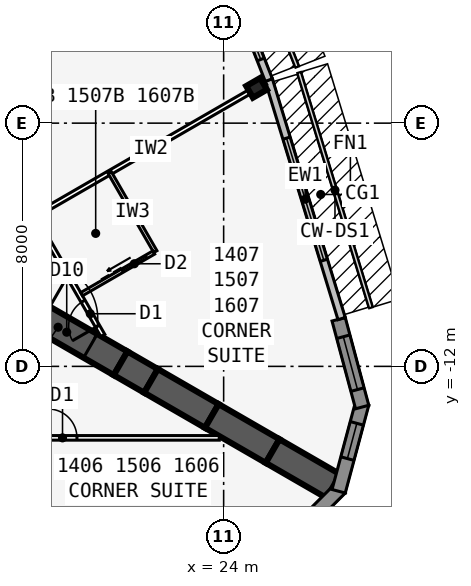
"""IFC4 building model, lengths in metres.
Left out: names, types, materials, properties, quantities, classifications, styles, units other than length and angle.
Written with IfcOpenShell. Run it as: python <this file> out.ifc"""

import sys

from ifc_helpers import new_model, si_unit, direction, frame, frame_2d, origin, origin_2d, place, context, subcontext, project, spatial, polyline, rectangle, i_section, outline, extrude, element, fill, save


model = new_model("IFC4")
c1 = context("Model", 3, precision=1e-05, world=origin(), true_north=direction((0.0, 1.0)))
c2 = subcontext(c1, "Body", "Model", "MODEL_VIEW")
j1 = project(units=[si_unit("LENGTHUNIT", "METRE"), si_unit("PLANEANGLEUNIT", "RADIAN")], contexts=[c1])
p1 = place(None, origin())
s1 = spatial("IfcSite", under=j1, at=p1, CompositionType="ELEMENT")
p2 = place(p1, origin())
s2 = spatial("IfcBuilding", under=s1, at=p2, CompositionType="ELEMENT")
p3 = place(p2, frame((0.0, 0.0, 59.1)))
s3 = spatial("IfcBuildingStorey", under=s2, at=p3, CompositionType="ELEMENT", Elevation=59.1)
p4 = place(p3, frame((16.5, -9.526, 0.0), z_axis=(0.0, 0.0, 1.0), x_axis=(0.866031398331, -0.499989616998, 0.0)))
e1 = element("IfcWall", 1, at=p4, inside=s3, PredefinedType="SHEAR", context=c2, shape_type="SweptSolid", body=[
    extrude(rectangle(XDim=4.746, YDim=0.9, at=frame_2d((2.373, 0.0))), origin(), (0.0, 0.0, 1.0), 3.4),
])
p5 = place(p4, frame((1.8, 0.0, 0.0)))
e2 = element("IfcOpeningElement", 2, at=p5, cuts=e1, PredefinedType="OPENING", context=c2, shape_type="SweptSolid", body=[
    extrude(rectangle(XDim=1.8, YDim=2.13, at=frame_2d((0.9, 1.065))), frame((0.0, 0.46, 0.0), z_axis=(0.0, -1.0, 0.0), x_axis=(1.0, 0.0, 0.0)), (0.0, 0.0, 1.0), 0.92),
])
p6 = place(p3, frame((20.61, -11.899, 0.0), z_axis=(0.0, 0.0, 1.0), x_axis=(0.866009537788, -0.500027479704, 0.0)))
e3 = element("IfcWall", 3, at=p6, inside=s3, PredefinedType="SHEAR", context=c2, shape_type="SweptSolid", body=[
    extrude(rectangle(XDim=1.155, YDim=0.9, at=frame_2d((0.577, 0.0))), origin(), (0.0, 0.0, 1.0), 3.4),
])
for number, where, z_axis, x_axis in (
    (4, (21.61, -12.477, 0.0), (0.0, 0.0, 1.0), (0.866, -0.5, 0.0)),
    (5, (23.61, -13.631, 0.0), (0.0, 0.0, 1.0), (0.866, -0.5, 0.0)),
    (6, (25.61, -14.786, 0.0), (0.0, 0.0, 1.0), (0.866, -0.5, 0.0)),
):
    element("IfcWall", number, at=place(p3, frame(where, z_axis=z_axis, x_axis=x_axis)), inside=s3, PredefinedType="SHEAR", context=c2, shape_type="SweptSolid", body=[
        extrude(rectangle(XDim=2.309, YDim=0.9, at=frame_2d((1.155, 0.0))), origin(), (0.0, 0.0, 1.0), 3.4),
    ])
p7 = place(p3, frame((25.083, -2.839, 0.0), z_axis=(0.0, 0.0, 1.0), x_axis=(-0.5, 0.866025403784, 0.0)))
e7 = element("IfcColumn", 7, at=p7, inside=s3, PredefinedType="COLUMN", context=c2, shape_type="SweptSolid", body=[
    extrude(i_section(OverallWidth=0.442, OverallDepth=0.531, WebThickness=0.066, FlangeThickness=0.106, at=origin_2d()), origin(), (0.0, 0.0, 1.0), 3.4),
])
p8 = place(p3, frame((25.728, -18.12, 0.0), z_axis=(0.0, 0.0, 1.0), x_axis=(0.707025086683, 0.707188466253, 0.0)))
e8 = element("IfcWall", 8, at=p8, inside=s3, PredefinedType="SOLIDWALL", context=c2, shape_type="SweptSolid", body=[
    extrude(outline(polyline([(2.989, 0.225), (2.93, 0.225), (2.438, 0.093), (2.402, 0.225), (0.0, 0.225), (0.0, -0.225), (2.989, -0.225), (2.989, 0.225)])), origin(), (0.0, 0.0, 1.0), 3.235),
])
p9 = place(p8, frame((0.676, 0.0, 0.45)))
e9 = element("IfcOpeningElement", 9, at=p9, cuts=e8, PredefinedType="OPENING", context=c2, shape_type="SweptSolid", body=[
    extrude(rectangle(XDim=1.2, YDim=2.4, at=frame_2d((0.6, 1.2))), frame((0.0, 0.235, 0.0), z_axis=(0.0, -1.0, 0.0), x_axis=(1.0, 0.0, 0.0)), (0.0, 0.0, 1.0), 0.47),
])
p10 = place(p3, frame((27.783, -16.108, 0.0), z_axis=(0.0, 0.0, 1.0), x_axis=(0.258801419081, 0.965930548995, 0.0)))
e10 = element("IfcWall", 10, at=p10, inside=s3, PredefinedType="SOLIDWALL", context=c2, shape_type="SweptSolid", body=[
    extrude(outline(polyline([(2.989, 0.225), (0.586, 0.225), (0.551, 0.093), (0.06, 0.225), (0.0, 0.225), (0.0, -0.225), (2.989, -0.225), (2.989, 0.225)])), origin(), (0.0, 0.0, 1.0), 3.235),
])
p11 = place(p10, frame((1.113, 0.0, 0.45)))
e11 = element("IfcOpeningElement", 11, at=p11, cuts=e10, PredefinedType="OPENING", context=c2, shape_type="SweptSolid", body=[
    extrude(rectangle(XDim=1.2, YDim=2.4, at=frame_2d((0.6, 1.2))), frame((0.0, 0.235, 0.0), z_axis=(0.0, -1.0, 0.0), x_axis=(1.0, 0.0, 0.0)), (0.0, 0.0, 1.0), 0.47),
])
p12 = place(p3, frame((28.556, -13.337, 0.0), z_axis=(0.0, 0.0, 1.0), x_axis=(-0.258780998834, 0.965936019953, 0.0)))
e12 = element("IfcWall", 12, at=p12, inside=s3, PredefinedType="SOLIDWALL", context=c2, shape_type="SweptSolid", body=[
    extrude(rectangle(XDim=2.989, YDim=0.45, at=frame_2d((1.494, 0.0))), origin(), (0.0, 0.0, 1.0), 3.235),
])
p13 = place(p12, frame((0.594, 0.0, 0.45)))
e13 = element("IfcOpeningElement", 13, at=p13, cuts=e12, PredefinedType="OPENING", context=c2, shape_type="SweptSolid", body=[
    extrude(rectangle(XDim=1.8, YDim=2.4, at=frame_2d((0.9, 1.2))), frame((0.0, 0.235, 0.0), z_axis=(0.0, -1.0, 0.0), x_axis=(1.0, 0.0, 0.0)), (0.0, 0.0, 1.0), 0.47),
])
p14 = place(p3, frame((27.88, -10.429, 0.0), z_axis=(0.0, 0.0, 1.0), x_axis=(-0.2919790669, 0.956424709265, 0.0)))
e14 = element("IfcWall", 14, at=p14, inside=s3, PredefinedType="STANDARD", context=c2, shape_type="SweptSolid", body=[
    extrude(rectangle(XDim=8.211, YDim=0.25, at=frame_2d((4.105, 0.0))), origin(), (0.0, 0.0, 1.0), 3.235),
])
p15 = place(p14, frame((2.006, 0.0, 0.45)))
e15 = element("IfcOpeningElement", 15, at=p15, cuts=e14, PredefinedType="OPENING", context=c2, shape_type="SweptSolid", body=[
    extrude(rectangle(XDim=4.2, YDim=2.4, at=frame_2d((2.1, 1.2))), frame((0.0, 0.135, 0.0), z_axis=(0.0, -1.0, 0.0), x_axis=(1.0, 0.0, 0.0)), (0.0, 0.0, 1.0), 0.27),
])
p16 = place(p3, frame((25.486, -2.584, 0.0), z_axis=(0.0, 0.0, 1.0), x_axis=(-0.364013463868, 0.931393685894, 0.0)))
e16 = element("IfcWall", 16, at=p16, inside=s3, PredefinedType="STANDARD", context=c2, shape_type="SweptSolid", body=[
    extrude(rectangle(XDim=5.058, YDim=0.25, at=frame_2d((2.529, 0.0))), origin(), (0.0, 0.0, 1.0), 3.235),
])
p17 = place(p16, frame((0.729, 0.0, 0.45)))
e17 = element("IfcOpeningElement", 17, at=p17, cuts=e16, PredefinedType="OPENING", context=c2, shape_type="SweptSolid", body=[
    extrude(rectangle(XDim=3.6, YDim=2.4, at=frame_2d((1.8, 1.2))), frame((0.0, 0.135, 0.0), z_axis=(0.0, -1.0, 0.0), x_axis=(1.0, 0.0, 0.0)), (0.0, 0.0, 1.0), 0.27),
])
p18 = place(p3, frame((-23.857, -14.351, 0.0), z_axis=(0.0, 0.0, 1.0), x_axis=(1.0, 0.0, 0.0)))
e18 = element("IfcWall", 18, at=p18, inside=s3, PredefinedType="PARTITIONING", context=c2, shape_type="SweptSolid", body=[
    extrude(rectangle(XDim=47.714, YDim=0.15, at=frame_2d((23.857, 0.0))), origin(), (0.0, 0.0, 1.0), 3.235),
])
p19 = place(p18, frame((4.682, 0.0, 0.0)))
e19 = element("IfcOpeningElement", 19, at=p19, cuts=e18, PredefinedType="OPENING", context=c2, shape_type="SweptSolid", body=[
    extrude(rectangle(XDim=0.95, YDim=2.13, at=frame_2d((0.475, 1.065))), frame((0.0, 0.085, 0.0), z_axis=(0.0, -1.0, 0.0), x_axis=(1.0, 0.0, 0.0)), (0.0, 0.0, 1.0), 0.17),
])
p20 = place(p18, frame((10.282, 0.0, 0.0)))
e20 = element("IfcOpeningElement", 20, at=p20, cuts=e18, PredefinedType="OPENING", context=c2, shape_type="SweptSolid", body=[
    extrude(rectangle(XDim=0.95, YDim=2.13, at=frame_2d((0.475, 1.065))), frame((0.0, 0.085, 0.0), z_axis=(0.0, -1.0, 0.0), x_axis=(1.0, 0.0, 0.0)), (0.0, 0.0, 1.0), 0.17),
])
p21 = place(p18, frame((16.482, 0.0, 0.0)))
e21 = element("IfcOpeningElement", 21, at=p21, cuts=e18, PredefinedType="OPENING", context=c2, shape_type="SweptSolid", body=[
    extrude(rectangle(XDim=0.95, YDim=2.13, at=frame_2d((0.475, 1.065))), frame((0.0, 0.085, 0.0), z_axis=(0.0, -1.0, 0.0), x_axis=(1.0, 0.0, 0.0)), (0.0, 0.0, 1.0), 0.17),
])
p22 = place(p18, frame((21.482, 0.0, 0.0)))
e22 = element("IfcOpeningElement", 22, at=p22, cuts=e18, PredefinedType="OPENING", context=c2, shape_type="SweptSolid", body=[
    extrude(rectangle(XDim=0.95, YDim=2.13, at=frame_2d((0.475, 1.065))), frame((0.0, 0.085, 0.0), z_axis=(0.0, -1.0, 0.0), x_axis=(1.0, 0.0, 0.0)), (0.0, 0.0, 1.0), 0.17),
])
p23 = place(p18, frame((25.857, 0.0, 0.0)))
e23 = element("IfcOpeningElement", 23, at=p23, cuts=e18, PredefinedType="OPENING", context=c2, shape_type="SweptSolid", body=[
    extrude(rectangle(XDim=1.0, YDim=2.13, at=frame_2d((0.5, 1.065))), frame((0.0, 0.085, 0.0), z_axis=(0.0, -1.0, 0.0), x_axis=(1.0, 0.0, 0.0)), (0.0, 0.0, 1.0), 0.17),
])
p24 = place(p18, frame((30.882, 0.0, 0.0)))
e24 = element("IfcOpeningElement", 24, at=p24, cuts=e18, PredefinedType="OPENING", context=c2, shape_type="SweptSolid", body=[
    extrude(rectangle(XDim=0.95, YDim=2.13, at=frame_2d((0.475, 1.065))), frame((0.0, 0.085, 0.0), z_axis=(0.0, -1.0, 0.0), x_axis=(1.0, 0.0, 0.0)), (0.0, 0.0, 1.0), 0.17),
])
p25 = place(p18, frame((42.082, 0.0, 0.0)))
e25 = element("IfcOpeningElement", 25, at=p25, cuts=e18, PredefinedType="OPENING", context=c2, shape_type="SweptSolid", body=[
    extrude(rectangle(XDim=0.95, YDim=2.13, at=frame_2d((0.475, 1.065))), frame((0.0, 0.085, 0.0), z_axis=(0.0, -1.0, 0.0), x_axis=(1.0, 0.0, 0.0)), (0.0, 0.0, 1.0), 0.17),
])
p26 = place(p3, frame((20.027, -10.985, 0.0), z_axis=(0.0, 0.0, 1.0), x_axis=(-0.500001677587, 0.866024435227, 0.0)))
e26 = element("IfcWall", 26, at=p26, inside=s3, PredefinedType="PARTITIONING", context=c2, shape_type="SweptSolid", body=[
    extrude(rectangle(XDim=39.054, YDim=0.15, at=frame_2d((19.527, 0.0))), origin(), (0.0, 0.0, 1.0), 3.235),
])
p27 = place(p26, frame((0.352, 0.0, 0.0)))
e27 = element("IfcOpeningElement", 27, at=p27, cuts=e26, PredefinedType="OPENING", context=c2, shape_type="SweptSolid", body=[
    extrude(rectangle(XDim=0.95, YDim=2.13, at=frame_2d((0.475, 1.065))), frame((0.0, 0.085, 0.0), z_axis=(0.0, -1.0, 0.0), x_axis=(1.0, 0.0, 0.0)), (0.0, 0.0, 1.0), 0.17),
])
p28 = place(p26, frame((10.352, 0.0, 0.0)))
e28 = element("IfcOpeningElement", 28, at=p28, cuts=e26, PredefinedType="OPENING", context=c2, shape_type="SweptSolid", body=[
    extrude(rectangle(XDim=0.95, YDim=2.13, at=frame_2d((0.475, 1.065))), frame((0.0, 0.085, 0.0), z_axis=(0.0, -1.0, 0.0), x_axis=(1.0, 0.0, 0.0)), (0.0, 0.0, 1.0), 0.17),
])
p29 = place(p26, frame((17.152, 0.0, 0.0)))
e29 = element("IfcOpeningElement", 29, at=p29, cuts=e26, PredefinedType="OPENING", context=c2, shape_type="SweptSolid", body=[
    extrude(rectangle(XDim=0.95, YDim=2.13, at=frame_2d((0.475, 1.065))), frame((0.0, 0.085, 0.0), z_axis=(0.0, -1.0, 0.0), x_axis=(1.0, 0.0, 0.0)), (0.0, 0.0, 1.0), 0.17),
])
p30 = place(p26, frame((20.952, 0.0, 0.0)))
e30 = element("IfcOpeningElement", 30, at=p30, cuts=e26, PredefinedType="OPENING", context=c2, shape_type="SweptSolid", body=[
    extrude(rectangle(XDim=0.95, YDim=2.13, at=frame_2d((0.475, 1.065))), frame((0.0, 0.085, 0.0), z_axis=(0.0, -1.0, 0.0), x_axis=(1.0, 0.0, 0.0)), (0.0, 0.0, 1.0), 0.17),
])
p31 = place(p26, frame((27.752, 0.0, 0.0)))
e31 = element("IfcOpeningElement", 31, at=p31, cuts=e26, PredefinedType="OPENING", context=c2, shape_type="SweptSolid", body=[
    extrude(rectangle(XDim=0.95, YDim=2.13, at=frame_2d((0.475, 1.065))), frame((0.0, 0.085, 0.0), z_axis=(0.0, -1.0, 0.0), x_axis=(1.0, 0.0, 0.0)), (0.0, 0.0, 1.0), 0.17),
])
p32 = place(p26, frame((37.752, 0.0, 0.0)))
e32 = element("IfcOpeningElement", 32, at=p32, cuts=e26, PredefinedType="OPENING", context=c2, shape_type="SweptSolid", body=[
    extrude(rectangle(XDim=0.95, YDim=2.13, at=frame_2d((0.475, 1.065))), frame((0.0, 0.085, 0.0), z_axis=(0.0, -1.0, 0.0), x_axis=(1.0, 0.0, 0.0)), (0.0, 0.0, 1.0), 0.17),
])
p33 = place(p3, frame((17.829, -7.027, 0.0), z_axis=(0.0, 0.0, 1.0), x_axis=(0.866032659912, 0.499987431809, 0.0)))
e33 = element("IfcWall", 33, at=p33, inside=s3, PredefinedType="PARTITIONING", context=c2, shape_type="SweptSolid", body=[
    extrude(rectangle(XDim=8.72, YDim=0.15, at=frame_2d((4.36, 0.0))), origin(), (0.0, 0.0, 1.0), 2.389),
])
p34 = place(p3, frame((21.753, -8.225, 0.0), z_axis=(0.0, 0.0, 1.0), x_axis=(-0.499990139034, 0.866031096941, 0.0)))
e34 = element("IfcWall", 34, at=p34, inside=s3, PredefinedType="PLUMBINGWALL", context=c2, shape_type="SweptSolid", body=[
    extrude(rectangle(XDim=3.0, YDim=0.12, at=frame_2d((1.5, 0.0))), origin(), (0.0, 0.0, 1.0), 3.235),
])
p35 = place(p3, frame((19.329, -9.625, 0.0), z_axis=(0.0, 0.0, 1.0), x_axis=(0.866035715982, 0.499982138324, 0.0)))
e35 = element("IfcWall", 35, at=p35, inside=s3, PredefinedType="PLUMBINGWALL", context=c2, shape_type="SweptSolid", body=[
    extrude(rectangle(XDim=2.74, YDim=0.12, at=frame_2d((1.37, 0.0))), origin(), (0.0, 0.0, 1.0), 3.235),
])
p36 = place(p35, frame((1.55, 0.0, 0.0)))
e36 = element("IfcOpeningElement", 36, at=p36, cuts=e35, PredefinedType="OPENING", context=c2, shape_type="SweptSolid", body=[
    extrude(rectangle(XDim=0.9, YDim=2.13, at=frame_2d((0.45, 1.065))), frame((0.0, 0.07, 0.0), z_axis=(0.0, -1.0, 0.0), x_axis=(1.0, 0.0, 0.0)), (0.0, 0.0, 1.0), 0.14),
])
p37 = place(p11, origin())
e37 = element("IfcWindow", 37, at=p37, inside=s3, PartitioningType="SINGLE_PANEL", PredefinedType="WINDOW", context=c2, shape_type="SweptSolid", body=[
    extrude(rectangle(XDim=1.2, YDim=2.4, at=frame_2d((0.6, 1.2))), frame((0.0, 0.03, 0.0), z_axis=(0.0, -1.0, 0.0), x_axis=(1.0, 0.0, 0.0)), (0.0, 0.0, 1.0), 0.06),
])
fill(e11, e37)
p38 = place(p13, origin())
e38 = element("IfcWindow", 38, at=p38, inside=s3, PartitioningType="SINGLE_PANEL", PredefinedType="WINDOW", context=c2, shape_type="SweptSolid", body=[
    extrude(rectangle(XDim=1.8, YDim=2.4, at=frame_2d((0.9, 1.2))), frame((0.0, 0.03, 0.0), z_axis=(0.0, -1.0, 0.0), x_axis=(1.0, 0.0, 0.0)), (0.0, 0.0, 1.0), 0.06),
])
fill(e13, e38)
p39 = place(p15, origin())
e39 = element("IfcWindow", 39, at=p39, inside=s3, PartitioningType="SINGLE_PANEL", PredefinedType="WINDOW", context=c2, shape_type="SweptSolid", body=[
    extrude(rectangle(XDim=4.2, YDim=2.4, at=frame_2d((2.1, 1.2))), frame((0.0, 0.03, 0.0), z_axis=(0.0, -1.0, 0.0), x_axis=(1.0, 0.0, 0.0)), (0.0, 0.0, 1.0), 0.06),
])
fill(e15, e39)
p40 = place(p17, origin())
e40 = element("IfcWindow", 40, at=p40, inside=s3, PartitioningType="SINGLE_PANEL", PredefinedType="WINDOW", context=c2, shape_type="SweptSolid", body=[
    extrude(rectangle(XDim=3.6, YDim=2.4, at=frame_2d((1.8, 1.2))), frame((0.0, 0.03, 0.0), z_axis=(0.0, -1.0, 0.0), x_axis=(1.0, 0.0, 0.0)), (0.0, 0.0, 1.0), 0.06),
])
fill(e17, e40)
p41 = place(p25, origin())
e41 = element("IfcDoor", 41, at=p41, inside=s3, OperationType="SINGLE_SWING_LEFT", PredefinedType="DOOR", context=c2, shape_type="SweptSolid", body=[
    extrude(rectangle(XDim=0.95, YDim=2.13, at=frame_2d((0.475, 1.065))), frame((0.0, 0.025, 0.0), z_axis=(0.0, -1.0, 0.0), x_axis=(1.0, 0.0, 0.0)), (0.0, 0.0, 1.0), 0.05),
])
fill(e25, e41)
p42 = place(p36, origin())
e42 = element("IfcDoor", 42, at=p42, inside=s3, OperationType="SLIDING_TO_LEFT", PredefinedType="DOOR", context=c2, shape_type="SweptSolid", body=[
    extrude(rectangle(XDim=0.9, YDim=2.13, at=frame_2d((0.45, 1.065))), frame((0.0, 0.025, 0.0), z_axis=(0.0, -1.0, 0.0), x_axis=(1.0, 0.0, 0.0)), (0.0, 0.0, 1.0), 0.05),
])
fill(e36, e42)
p43 = place(p27, origin())
e43 = element("IfcDoor", 43, at=p43, inside=s3, OperationType="SINGLE_SWING_LEFT", PredefinedType="DOOR", context=c2, shape_type="SweptSolid", body=[
    extrude(rectangle(XDim=0.95, YDim=2.13, at=frame_2d((0.475, 1.065))), frame((0.0, 0.025, 0.0), z_axis=(0.0, -1.0, 0.0), x_axis=(1.0, 0.0, 0.0)), (0.0, 0.0, 1.0), 0.05),
])
fill(e27, e43)
p44 = place(p5, origin())
e44 = element("IfcDoor", 44, at=p44, inside=s3, OperationType="DOUBLE_DOOR_DOUBLE_SWING", PredefinedType="DOOR", context=c2, shape_type="SweptSolid", body=[
    extrude(rectangle(XDim=1.8, YDim=2.13, at=frame_2d((0.9, 1.065))), frame((0.0, 0.025, 0.0), z_axis=(0.0, -1.0, 0.0), x_axis=(1.0, 0.0, 0.0)), (0.0, 0.0, 1.0), 0.05),
])
fill(e2, e44)
save(model, sys.argv[1])
